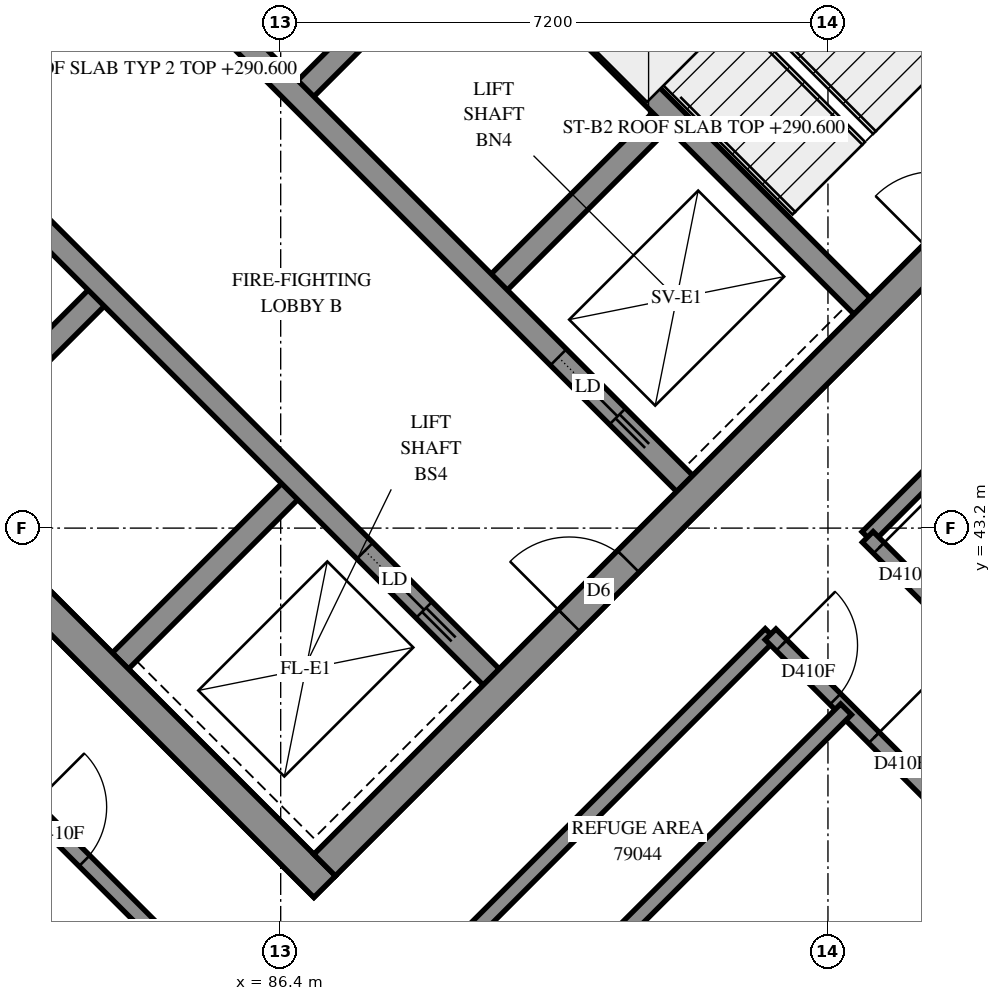
"""IFC4 building model, lengths in metres.
Left out: names, types, materials, properties, quantities, classifications, styles, units other than length and angle.
Written with IfcOpenShell. Run it as: python <this file> out.ifc"""

import sys

from ifc_helpers import new_model, si_unit, direction, frame, frame_2d, origin, place, context, subcontext, project, spatial, polyline, rectangle, outline, extrude, element, fill, save


model = new_model("IFC4")
c1 = context("Model", 3, precision=1e-05, world=origin(), true_north=direction((0.0, 1.0)))
c2 = subcontext(c1, "Body", "Model", "MODEL_VIEW")
j1 = project(units=[si_unit("LENGTHUNIT", "METRE"), si_unit("PLANEANGLEUNIT", "RADIAN")], contexts=[c1])
p1 = place(None, origin())
s1 = spatial("IfcSite", under=j1, at=p1, CompositionType="ELEMENT")
p2 = place(p1, origin())
s2 = spatial("IfcBuilding", under=s1, at=p2, CompositionType="ELEMENT")
p3 = place(p2, frame((0.0, 0.0, 290.6)))
s3 = spatial("IfcBuildingStorey", under=s2, at=p3, CompositionType="ELEMENT", Elevation=290.6)
p4 = place(p3, frame((76.23, 49.231, -0.3), z_axis=(0.0, 0.0, 1.0), x_axis=(0.7071034917, -0.7071100706, 0.0)))
e1 = element("IfcWall", 1, at=p4, inside=s3, PredefinedType="SHEAR", context=c2, shape_type="SweptSolid", body=[
    extrude(rectangle(XDim=15.2, YDim=0.4, at=frame_2d((7.6, 0.0))), origin(), (0.0, 0.0, 1.0), 3.1),
])
p5 = place(p3, frame((86.695, 59.696, -0.3), z_axis=(0.0, 0.0, 1.0), x_axis=(0.7071100706, -0.7071034917, 0.0)))
e2 = element("IfcWall", 2, at=p5, inside=s3, PredefinedType="SHEAR", context=c2, shape_type="SweptSolid", body=[
    extrude(rectangle(XDim=15.2, YDim=0.4, at=frame_2d((7.6, 0.0))), origin(), (0.0, 0.0, 1.0), 3.1),
])
p6 = place(p5, frame((10.4, 0.0, 0.3)))
e3 = element("IfcOpeningElement", 3, at=p6, cuts=e2, PredefinedType="OPENING", context=c2, shape_type="SweptSolid", body=[
    extrude(rectangle(XDim=0.8, YDim=2.1, at=frame_2d((0.4, 1.05))), frame((0.0, 0.21, 0.0), z_axis=(0.0, -1.0, 0.0), x_axis=(1.0, 0.0, 0.0)), (0.0, 0.0, 1.0), 0.42),
])
p7 = place(p3, frame((76.513, 49.231, -0.3), z_axis=(0.0, 0.0, 1.0), x_axis=(0.7071067812, 0.7071067812, 0.0)))
e4 = element("IfcWall", 4, at=p7, inside=s3, PredefinedType="SHEAR", context=c2, shape_type="SweptSolid", body=[
    extrude(rectangle(XDim=14.4, YDim=0.4, at=frame_2d((7.2, 0.0))), origin(), (0.0, 0.0, 1.0), 3.1),
])
p8 = place(p7, frame((4.55, 0.0, 0.3)))
e5 = element("IfcOpeningElement", 5, at=p8, cuts=e4, PredefinedType="OPENING", context=c2, shape_type="SweptSolid", body=[
    extrude(rectangle(XDim=1.1, YDim=2.1, at=frame_2d((0.55, 1.05))), frame((0.0, 0.21, 0.0), z_axis=(0.0, -1.0, 0.0), x_axis=(1.0, 0.0, 0.0)), (0.0, 0.0, 1.0), 0.42),
])
p9 = place(p7, frame((11.35, 0.0, 0.3)))
e6 = element("IfcOpeningElement", 6, at=p9, cuts=e4, PredefinedType="OPENING", context=c2, shape_type="SweptSolid", body=[
    extrude(rectangle(XDim=1.1, YDim=2.1, at=frame_2d((0.55, 1.05))), frame((0.0, 0.21, 0.0), z_axis=(0.0, -1.0, 0.0), x_axis=(1.0, 0.0, 0.0)), (0.0, 0.0, 1.0), 0.42),
])
p10 = place(p3, frame((86.978, 38.766, -0.3), z_axis=(0.0, 0.0, 1.0), x_axis=(0.7071067812, 0.7071067812, 0.0)))
e7 = element("IfcWall", 7, at=p10, inside=s3, PredefinedType="SHEAR", context=c2, shape_type="SweptSolid", body=[
    extrude(rectangle(XDim=14.4, YDim=0.4, at=frame_2d((7.2, 0.0))), origin(), (0.0, 0.0, 1.0), 3.1),
])
p11 = place(p10, frame((4.55, 0.0, 0.3)))
e8 = element("IfcOpeningElement", 8, at=p11, cuts=e7, PredefinedType="OPENING", context=c2, shape_type="SweptSolid", body=[
    extrude(rectangle(XDim=1.1, YDim=2.1, at=frame_2d((0.55, 1.05))), frame((0.0, 0.21, 0.0), z_axis=(0.0, -1.0, 0.0), x_axis=(1.0, 0.0, 0.0)), (0.0, 0.0, 1.0), 0.42),
])
p12 = place(p10, frame((11.35, 0.0, 0.3)))
e9 = element("IfcOpeningElement", 9, at=p12, cuts=e7, PredefinedType="OPENING", context=c2, shape_type="SweptSolid", body=[
    extrude(rectangle(XDim=1.1, YDim=2.1, at=frame_2d((0.55, 1.05))), frame((0.0, 0.21, 0.0), z_axis=(0.0, -1.0, 0.0), x_axis=(1.0, 0.0, 0.0)), (0.0, 0.0, 1.0), 0.42),
])
p13 = place(p3, frame((81.746, 43.999, 0.0), z_axis=(0.0, 0.0, 1.0), x_axis=(0.7071067812, 0.7071067812, 0.0)))
e10 = element("IfcWall", 10, at=p13, inside=s3, PredefinedType="SOLIDWALL", context=c2, shape_type="SweptSolid", body=[
    extrude(rectangle(XDim=3.3, YDim=0.3, at=frame_2d((1.65, 0.0))), origin(), (0.0, 0.0, 1.0), 3.5),
])
p14 = place(p3, frame((86.625, 48.878, 0.0), z_axis=(0.0, 0.0, 1.0), x_axis=(0.7071067812, 0.7071067812, 0.0)))
e11 = element("IfcWall", 11, at=p14, inside=s3, PredefinedType="SOLIDWALL", context=c2, shape_type="SweptSolid", body=[
    extrude(rectangle(XDim=3.3, YDim=0.3, at=frame_2d((1.65, 0.0))), origin(), (0.0, 0.0, 1.0), 3.5),
])
p15 = place(p3, frame((84.291, 41.453, 0.0), z_axis=(0.0, 0.0, 1.0), x_axis=(0.7071067812, 0.7071067812, 0.0)))
e12 = element("IfcWall", 12, at=p15, inside=s3, PredefinedType="SOLIDWALL", context=c2, shape_type="SweptSolid", body=[
    extrude(rectangle(XDim=3.3, YDim=0.3, at=frame_2d((1.65, 0.0))), origin(), (0.0, 0.0, 1.0), 3.5),
])
p16 = place(p3, frame((89.17, 46.332, 0.0), z_axis=(0.0, 0.0, 1.0), x_axis=(0.7071067812, 0.7071067812, 0.0)))
e13 = element("IfcWall", 13, at=p16, inside=s3, PredefinedType="SOLIDWALL", context=c2, shape_type="SweptSolid", body=[
    extrude(rectangle(XDim=3.3, YDim=0.3, at=frame_2d((1.65, 0.0))), origin(), (0.0, 0.0, 1.0), 3.5),
])
p17 = place(p3, frame((78.988, 51.423, 0.0), z_axis=(0.0, 0.0, 1.0), x_axis=(0.7071067812, -0.7071067812, 0.0)))
e14 = element("IfcWall", 14, at=p17, inside=s3, PredefinedType="SOLIDWALL", context=c2, shape_type="SweptSolid", body=[
    extrude(rectangle(XDim=14.4, YDim=0.3, at=frame_2d((7.2, 0.0))), origin(), (0.0, 0.0, 1.0), 3.5),
])
p18 = place(p17, frame((12.05, 0.0, 0.0)))
e15 = element("IfcOpeningElement", 15, at=p18, cuts=e14, PredefinedType="OPENING", context=c2, shape_type="SweptSolid", body=[
    extrude(rectangle(XDim=1.1, YDim=2.1, at=frame_2d((0.55, 1.05))), frame((0.0, 0.16, 0.0), z_axis=(0.0, -1.0, 0.0), x_axis=(1.0, 0.0, 0.0)), (0.0, 0.0, 1.0), 0.32),
])
p19 = place(p3, frame((81.534, 53.969, 0.0), z_axis=(0.0, 0.0, 1.0), x_axis=(0.707103309, -0.7071102534, 0.0)))
e16 = element("IfcWall", 16, at=p19, inside=s3, PredefinedType="SOLIDWALL", context=c2, shape_type="SweptSolid", body=[
    extrude(rectangle(XDim=14.4, YDim=0.3, at=frame_2d((7.2, 0.0))), origin(), (0.0, 0.0, 1.0), 3.5),
])
p20 = place(p19, frame((12.05, 0.0, 0.0)))
e17 = element("IfcOpeningElement", 17, at=p20, cuts=e16, PredefinedType="OPENING", context=c2, shape_type="SweptSolid", body=[
    extrude(rectangle(XDim=1.1, YDim=2.1, at=frame_2d((0.55, 1.05))), frame((0.0, 0.16, 0.0), z_axis=(0.0, -1.0, 0.0), x_axis=(1.0, 0.0, 0.0)), (0.0, 0.0, 1.0), 0.32),
])
p21 = place(p3, frame((88.958, 51.211, 0.0), z_axis=(0.0, 0.0, 1.0), x_axis=(0.7070998367, -0.7071137256, 0.0)))
e18 = element("IfcWall", 18, at=p21, inside=s3, PredefinedType="SOLIDWALL", context=c2, shape_type="SweptSolid", body=[
    extrude(rectangle(XDim=7.2, YDim=0.3, at=frame_2d((3.6, 0.0))), origin(), (0.0, 0.0, 1.0), 3.5),
])
p22 = place(p3, frame((89.382, 29.856, 0.0), z_axis=(0.0, 0.0, 1.0), x_axis=(0.7071094407, 0.7071041216, 0.0)))
e19 = element("IfcWall", 19, at=p22, inside=s3, PredefinedType="SOLIDWALL", context=c2, shape_type="SweptSolid", body=[
    extrude(outline(polyline([(-0.2, -0.2), (19.0, -0.2), (18.6, 0.2), (0.2, 0.2), (-0.2, -0.2)])), origin(), (0.0, 0.0, 1.0), 3.0),
])
p23 = place(p22, frame((1.9, 0.0, 0.7)))
e20 = element("IfcOpeningElement", 20, at=p23, cuts=e19, PredefinedType="OPENING", context=c2, shape_type="SweptSolid", body=[
    extrude(rectangle(XDim=1.8, YDim=2.2, at=frame_2d((0.9, 1.1))), frame((0.0, 0.21, 0.0), z_axis=(0.0, -1.0, 0.0), x_axis=(1.0, 0.0, 0.0)), (0.0, 0.0, 1.0), 0.42),
])
p24 = place(p22, frame((5.5, 0.0, 0.7)))
e21 = element("IfcOpeningElement", 21, at=p24, cuts=e19, PredefinedType="OPENING", context=c2, shape_type="SweptSolid", body=[
    extrude(rectangle(XDim=1.8, YDim=2.2, at=frame_2d((0.9, 1.1))), frame((0.0, 0.21, 0.0), z_axis=(0.0, -1.0, 0.0), x_axis=(1.0, 0.0, 0.0)), (0.0, 0.0, 1.0), 0.42),
])
p25 = place(p22, frame((8.95, 0.0, 0.7)))
e22 = element("IfcOpeningElement", 22, at=p25, cuts=e19, PredefinedType="OPENING", context=c2, shape_type="SweptSolid", body=[
    extrude(rectangle(XDim=1.8, YDim=2.2, at=frame_2d((0.9, 1.1))), frame((0.0, 0.21, 0.0), z_axis=(0.0, -1.0, 0.0), x_axis=(1.0, 0.0, 0.0)), (0.0, 0.0, 1.0), 0.42),
])
p26 = place(p22, frame((12.85, 0.0, 0.7)))
e23 = element("IfcOpeningElement", 23, at=p26, cuts=e19, PredefinedType="OPENING", context=c2, shape_type="SweptSolid", body=[
    extrude(rectangle(XDim=1.8, YDim=2.2, at=frame_2d((0.9, 1.1))), frame((0.0, 0.21, 0.0), z_axis=(0.0, -1.0, 0.0), x_axis=(1.0, 0.0, 0.0)), (0.0, 0.0, 1.0), 0.42),
])
p27 = place(p22, frame((16.0, 0.0, 0.7)))
e24 = element("IfcOpeningElement", 24, at=p27, cuts=e19, PredefinedType="OPENING", context=c2, shape_type="SweptSolid", body=[
    extrude(rectangle(XDim=1.8, YDim=2.2, at=frame_2d((0.9, 1.1))), frame((0.0, 0.21, 0.0), z_axis=(0.0, -1.0, 0.0), x_axis=(1.0, 0.0, 0.0)), (0.0, 0.0, 1.0), 0.42),
])
p28 = place(p3, frame((78.297, 40.941, 0.0), z_axis=(0.0, 0.0, 1.0), x_axis=(0.7071035917, -0.7071099707, 0.0)))
e25 = element("IfcWall", 25, at=p28, inside=s3, PredefinedType="SOLIDWALL", context=c2, shape_type="SweptSolid", body=[
    extrude(outline(polyline([(0.047, -0.2), (15.877, -0.2), (15.476, 0.2), (-0.047, 0.2), (0.047, -0.2)])), origin(), (0.0, 0.0, 1.0), 3.5),
])
p29 = place(p28, frame((1.138, 0.0, 0.7)))
e26 = element("IfcOpeningElement", 26, at=p29, cuts=e25, PredefinedType="OPENING", context=c2, shape_type="SweptSolid", body=[
    extrude(rectangle(XDim=1.8, YDim=2.2, at=frame_2d((0.9, 1.1))), frame((0.0, 0.21, 0.0), z_axis=(0.0, -1.0, 0.0), x_axis=(1.0, 0.0, 0.0)), (0.0, 0.0, 1.0), 0.42),
])
p30 = place(p28, frame((4.777, 0.0, 0.7)))
e27 = element("IfcOpeningElement", 27, at=p30, cuts=e25, PredefinedType="OPENING", context=c2, shape_type="SweptSolid", body=[
    extrude(rectangle(XDim=1.8, YDim=2.2, at=frame_2d((0.9, 1.1))), frame((0.0, 0.21, 0.0), z_axis=(0.0, -1.0, 0.0), x_axis=(1.0, 0.0, 0.0)), (0.0, 0.0, 1.0), 0.42),
])
p31 = place(p28, frame((8.377, 0.0, 0.7)))
e28 = element("IfcOpeningElement", 28, at=p31, cuts=e25, PredefinedType="OPENING", context=c2, shape_type="SweptSolid", body=[
    extrude(rectangle(XDim=1.8, YDim=2.2, at=frame_2d((0.9, 1.1))), frame((0.0, 0.21, 0.0), z_axis=(0.0, -1.0, 0.0), x_axis=(1.0, 0.0, 0.0)), (0.0, 0.0, 1.0), 0.42),
])
p32 = place(p28, frame((11.976, 0.0, 0.7)))
e29 = element("IfcOpeningElement", 29, at=p32, cuts=e25, PredefinedType="OPENING", context=c2, shape_type="SweptSolid", body=[
    extrude(rectangle(XDim=1.8, YDim=2.2, at=frame_2d((0.9, 1.1))), frame((0.0, 0.21, 0.0), z_axis=(0.0, -1.0, 0.0), x_axis=(1.0, 0.0, 0.0)), (0.0, 0.0, 1.0), 0.42),
])
p33 = place(p3, frame((91.313, 53.354, 0.0), z_axis=(0.0, 0.0, 1.0), x_axis=(0.7071147811, -0.7070987812, 0.0)))
e30 = element("IfcWall", 30, at=p33, inside=s3, PredefinedType="PARTITIONING", context=c2, shape_type="SweptSolid", body=[
    extrude(rectangle(XDim=6.25, YDim=0.15, at=frame_2d((3.125, 0.0))), origin(), (0.0, 0.0, 1.0), 3.5),
])
p34 = place(p3, frame((81.534, 48.878, 0.0), z_axis=(0.0, 0.0, 1.0), x_axis=(0.707092892, 0.7071206701, 0.0)))
e31 = element("IfcWall", 31, at=p34, inside=s3, PredefinedType="PARTITIONING", context=c2, shape_type="SweptSolid", body=[
    extrude(rectangle(XDim=3.6, YDim=0.2, at=frame_2d((1.8, 0.0))), origin(), (0.0, 0.0, 1.0), 3.5),
])
p35 = place(p34, frame((1.25, 0.0, 0.0)))
e32 = element("IfcOpeningElement", 32, at=p35, cuts=e31, PredefinedType="OPENING", context=c2, shape_type="SweptSolid", body=[
    extrude(rectangle(XDim=1.1, YDim=2.1, at=frame_2d((0.55, 1.05))), frame((0.0, 0.11, 0.0), z_axis=(0.0, -1.0, 0.0), x_axis=(1.0, 0.0, 0.0)), (0.0, 0.0, 1.0), 0.22),
])
p36 = place(p3, frame((86.833, 62.381, 0.0), z_axis=(0.0, 0.0, 1.0), x_axis=(0.7071067812, -0.7071067812, 0.0)))
e33 = element("IfcWall", 33, at=p36, inside=s3, PredefinedType="PARTITIONING", context=c2, shape_type="SweptSolid", body=[
    extrude(rectangle(XDim=18.801, YDim=0.2, at=frame_2d((9.4, 0.0))), origin(), (0.0, 0.0, 1.0), 3.5),
])
p37 = place(p36, frame((4.276, 0.0, 0.0)))
e34 = element("IfcOpeningElement", 34, at=p37, cuts=e33, PredefinedType="OPENING", context=c2, shape_type="SweptSolid", body=[
    extrude(rectangle(XDim=1.0, YDim=2.1, at=frame_2d((0.5, 1.05))), frame((0.0, 0.11, 0.0), z_axis=(0.0, -1.0, 0.0), x_axis=(1.0, 0.0, 0.0)), (0.0, 0.0, 1.0), 0.22),
])
p38 = place(p36, frame((6.326, 0.0, 0.0)))
e35 = element("IfcOpeningElement", 35, at=p38, cuts=e33, PredefinedType="OPENING", context=c2, shape_type="SweptSolid", body=[
    extrude(rectangle(XDim=1.0, YDim=2.1, at=frame_2d((0.5, 1.05))), frame((0.0, 0.11, 0.0), z_axis=(0.0, -1.0, 0.0), x_axis=(1.0, 0.0, 0.0)), (0.0, 0.0, 1.0), 0.22),
])
p39 = place(p36, frame((11.476, 0.0, 0.0)))
e36 = element("IfcOpeningElement", 36, at=p39, cuts=e33, PredefinedType="OPENING", context=c2, shape_type="SweptSolid", body=[
    extrude(rectangle(XDim=1.0, YDim=2.1, at=frame_2d((0.5, 1.05))), frame((0.0, 0.11, 0.0), z_axis=(0.0, -1.0, 0.0), x_axis=(1.0, 0.0, 0.0)), (0.0, 0.0, 1.0), 0.22),
])
p40 = place(p36, frame((13.526, 0.0, 0.0)))
e37 = element("IfcOpeningElement", 37, at=p40, cuts=e33, PredefinedType="OPENING", context=c2, shape_type="SweptSolid", body=[
    extrude(rectangle(XDim=1.0, YDim=2.1, at=frame_2d((0.5, 1.05))), frame((0.0, 0.11, 0.0), z_axis=(0.0, -1.0, 0.0), x_axis=(1.0, 0.0, 0.0)), (0.0, 0.0, 1.0), 0.22),
])
for number, where, z_axis, x_axis in (
    (38, (86.835, 35.797, 0.0), (0.0, 0.0, 1.0), (0.707, 0.707, 0.0)),
    (39, (94.12, 43.081, 0.0), (0.0, 0.0, 1.0), (0.707, 0.707, 0.0)),
):
    element("IfcWall", number, at=place(p3, frame(where, z_axis=z_axis, x_axis=x_axis)), inside=s3, PredefinedType="PARTITIONING", context=c2, shape_type="SweptSolid", body=[
        extrude(rectangle(XDim=8.499, YDim=0.2, at=frame_2d((4.25, 0.0))), origin(), (0.0, 0.0, 1.0), 3.5),
    ])
p41 = place(p3, frame((94.124, 43.084, 0.0), z_axis=(0.0, 0.0, 1.0), x_axis=(0.7071067812, -0.7071067812, 0.0)))
e40 = element("IfcWall", 40, at=p41, inside=s3, PredefinedType="PARTITIONING", context=c2, shape_type="SweptSolid", body=[
    extrude(rectangle(XDim=5.001, YDim=0.2, at=frame_2d((2.5, 0.0))), origin(), (0.0, 0.0, 1.0), 3.5),
])
p42 = place(p41, frame((0.206, 0.0, 0.0)))
e41 = element("IfcOpeningElement", 41, at=p42, cuts=e40, PredefinedType="OPENING", context=c2, shape_type="SweptSolid", body=[
    extrude(rectangle(XDim=1.0, YDim=2.1, at=frame_2d((0.5, 1.05))), frame((0.0, 0.11, 0.0), z_axis=(0.0, -1.0, 0.0), x_axis=(1.0, 0.0, 0.0)), (0.0, 0.0, 1.0), 0.22),
])
p43 = place(p41, frame((1.925, 0.0, 0.0)))
e42 = element("IfcOpeningElement", 42, at=p43, cuts=e40, PredefinedType="OPENING", context=c2, shape_type="SweptSolid", body=[
    extrude(rectangle(XDim=1.0, YDim=2.1, at=frame_2d((0.5, 1.05))), frame((0.0, 0.11, 0.0), z_axis=(0.0, -1.0, 0.0), x_axis=(1.0, 0.0, 0.0)), (0.0, 0.0, 1.0), 0.22),
])
p44 = place(p3, frame((92.845, 41.803, 0.0), z_axis=(0.0, 0.0, 1.0), x_axis=(0.7071067812, -0.7071067812, 0.0)))
e43 = element("IfcWall", 43, at=p44, inside=s3, PredefinedType="PARTITIONING", context=c2, shape_type="SweptSolid", body=[
    extrude(rectangle(XDim=4.998, YDim=0.2, at=frame_2d((2.499, 0.0))), origin(), (0.0, 0.0, 1.0), 3.5),
])
p45 = place(p44, frame((0.205, 0.0, 0.0)))
e44 = element("IfcOpeningElement", 44, at=p45, cuts=e43, PredefinedType="OPENING", context=c2, shape_type="SweptSolid", body=[
    extrude(rectangle(XDim=1.0, YDim=2.1, at=frame_2d((0.5, 1.05))), frame((0.0, 0.11, 0.0), z_axis=(0.0, -1.0, 0.0), x_axis=(1.0, 0.0, 0.0)), (0.0, 0.0, 1.0), 0.22),
])
p46 = place(p44, frame((1.924, 0.0, 0.0)))
e45 = element("IfcOpeningElement", 45, at=p46, cuts=e43, PredefinedType="OPENING", context=c2, shape_type="SweptSolid", body=[
    extrude(rectangle(XDim=1.0, YDim=2.1, at=frame_2d((0.5, 1.05))), frame((0.0, 0.11, 0.0), z_axis=(0.0, -1.0, 0.0), x_axis=(1.0, 0.0, 0.0)), (0.0, 0.0, 1.0), 0.22),
])
p47 = place(p3, frame((82.18, 40.46, 0.0), z_axis=(0.0, 0.0, 1.0), x_axis=(0.7071067812, -0.7071067812, 0.0)))
e46 = element("IfcWall", 46, at=p47, inside=s3, PredefinedType="PARTITIONING", context=c2, shape_type="SweptSolid", body=[
    extrude(rectangle(XDim=4.391, YDim=0.2, at=frame_2d((2.196, 0.0))), origin(), (0.0, 0.0, 1.0), 3.5),
])
p48 = place(p47, frame((1.316, 0.0, 0.0)))
e47 = element("IfcOpeningElement", 47, at=p48, cuts=e46, PredefinedType="OPENING", context=c2, shape_type="SweptSolid", body=[
    extrude(rectangle(XDim=1.0, YDim=2.1, at=frame_2d((0.5, 1.05))), frame((0.0, 0.11, 0.0), z_axis=(0.0, -1.0, 0.0), x_axis=(1.0, 0.0, 0.0)), (0.0, 0.0, 1.0), 0.22),
])
p49 = place(p3, frame((94.823, 36.713, 0.0), z_axis=(0.0, 0.0, 1.0), x_axis=(0.7066530715, 0.7075602, 0.0)))
e48 = element("IfcWall", 48, at=p49, inside=s3, PredefinedType="PARTITIONING", context=c2, shape_type="SweptSolid", body=[
    extrude(rectangle(XDim=2.205, YDim=0.2, at=frame_2d((1.102, 0.0))), origin(), (0.0, 0.0, 1.0), 3.0),
])
p50 = place(p3, frame((86.271, 33.251, 0.0), z_axis=(0.0, 0.0, 1.0), x_axis=(0.7071908866, 0.7070226658, 0.0)))
e49 = element("IfcWall", 49, at=p50, inside=s3, PredefinedType="PARTITIONING", context=c2, shape_type="SweptSolid", body=[
    extrude(outline(polyline([(0.0, -0.1), (10.7, -0.1), (10.7, 0.1), (0.0, 0.1), (0.0, -0.1)])), origin(), (0.0, 0.0, 1.0), 3.5),
])
p51 = place(p11, origin())
e50 = element("IfcDoor", 50, at=p51, inside=s3, OperationType="DOUBLE_DOOR_SINGLE_SWING", PredefinedType="DOOR", context=c2, shape_type="SweptSolid", body=[
    extrude(rectangle(XDim=1.1, YDim=2.1, at=frame_2d((0.55, 1.05))), frame((0.0, 0.025, 0.0), z_axis=(0.0, -1.0, 0.0), x_axis=(1.0, 0.0, 0.0)), (0.0, 0.0, 1.0), 0.05),
])
fill(e8, e50)
p52 = place(p18, origin())
e51 = element("IfcDoor", 51, at=p52, inside=s3, OperationType="SLIDING_TO_RIGHT", PredefinedType="DOOR", context=c2, shape_type="SweptSolid", body=[
    extrude(rectangle(XDim=1.1, YDim=2.1, at=frame_2d((0.55, 1.05))), frame((0.0, 0.025, 0.0), z_axis=(0.0, -1.0, 0.0), x_axis=(1.0, 0.0, 0.0)), (0.0, 0.0, 1.0), 0.05),
])
fill(e15, e51)
p53 = place(p20, origin())
e52 = element("IfcDoor", 52, at=p53, inside=s3, OperationType="SLIDING_TO_RIGHT", PredefinedType="DOOR", context=c2, shape_type="SweptSolid", body=[
    extrude(rectangle(XDim=1.1, YDim=2.1, at=frame_2d((0.55, 1.05))), frame((0.0, 0.025, 0.0), z_axis=(0.0, -1.0, 0.0), x_axis=(1.0, 0.0, 0.0)), (0.0, 0.0, 1.0), 0.05),
])
fill(e17, e52)
p54 = place(p42, origin())
e53 = element("IfcDoor", 53, at=p54, inside=s3, OperationType="SINGLE_SWING_LEFT", PredefinedType="DOOR", context=c2, shape_type="SweptSolid", body=[
    extrude(rectangle(XDim=1.0, YDim=2.1, at=frame_2d((0.5, 1.05))), frame((0.0, 0.025, 0.0), z_axis=(0.0, -1.0, 0.0), x_axis=(1.0, 0.0, 0.0)), (0.0, 0.0, 1.0), 0.05),
])
fill(e41, e53)
p55 = place(p48, origin())
e54 = element("IfcDoor", 54, at=p55, inside=s3, OperationType="SINGLE_SWING_LEFT", PredefinedType="DOOR", context=c2, shape_type="SweptSolid", body=[
    extrude(rectangle(XDim=1.0, YDim=2.1, at=frame_2d((0.5, 1.05))), frame((0.0, 0.025, 0.0), z_axis=(0.0, -1.0, 0.0), x_axis=(1.0, 0.0, 0.0)), (0.0, 0.0, 1.0), 0.05),
])
fill(e47, e54)
p56 = place(p45, origin())
e55 = element("IfcDoor", 55, at=p56, inside=s3, OperationType="SINGLE_SWING_RIGHT", PredefinedType="DOOR", context=c2, shape_type="SweptSolid", body=[
    extrude(rectangle(XDim=1.0, YDim=2.1, at=frame_2d((0.5, 1.05))), frame((0.0, 0.025, 0.0), z_axis=(0.0, -1.0, 0.0), x_axis=(1.0, 0.0, 0.0)), (0.0, 0.0, 1.0), 0.05),
])
fill(e44, e55)
p57 = place(p46, origin())
e56 = element("IfcDoor", 56, at=p57, inside=s3, OperationType="SINGLE_SWING_LEFT", PredefinedType="DOOR", context=c2, shape_type="SweptSolid", body=[
    extrude(rectangle(XDim=1.0, YDim=2.1, at=frame_2d((0.5, 1.05))), frame((0.0, 0.025, 0.0), z_axis=(0.0, -1.0, 0.0), x_axis=(1.0, 0.0, 0.0)), (0.0, 0.0, 1.0), 0.05),
])
fill(e45, e56)
save(model, sys.argv[1])
